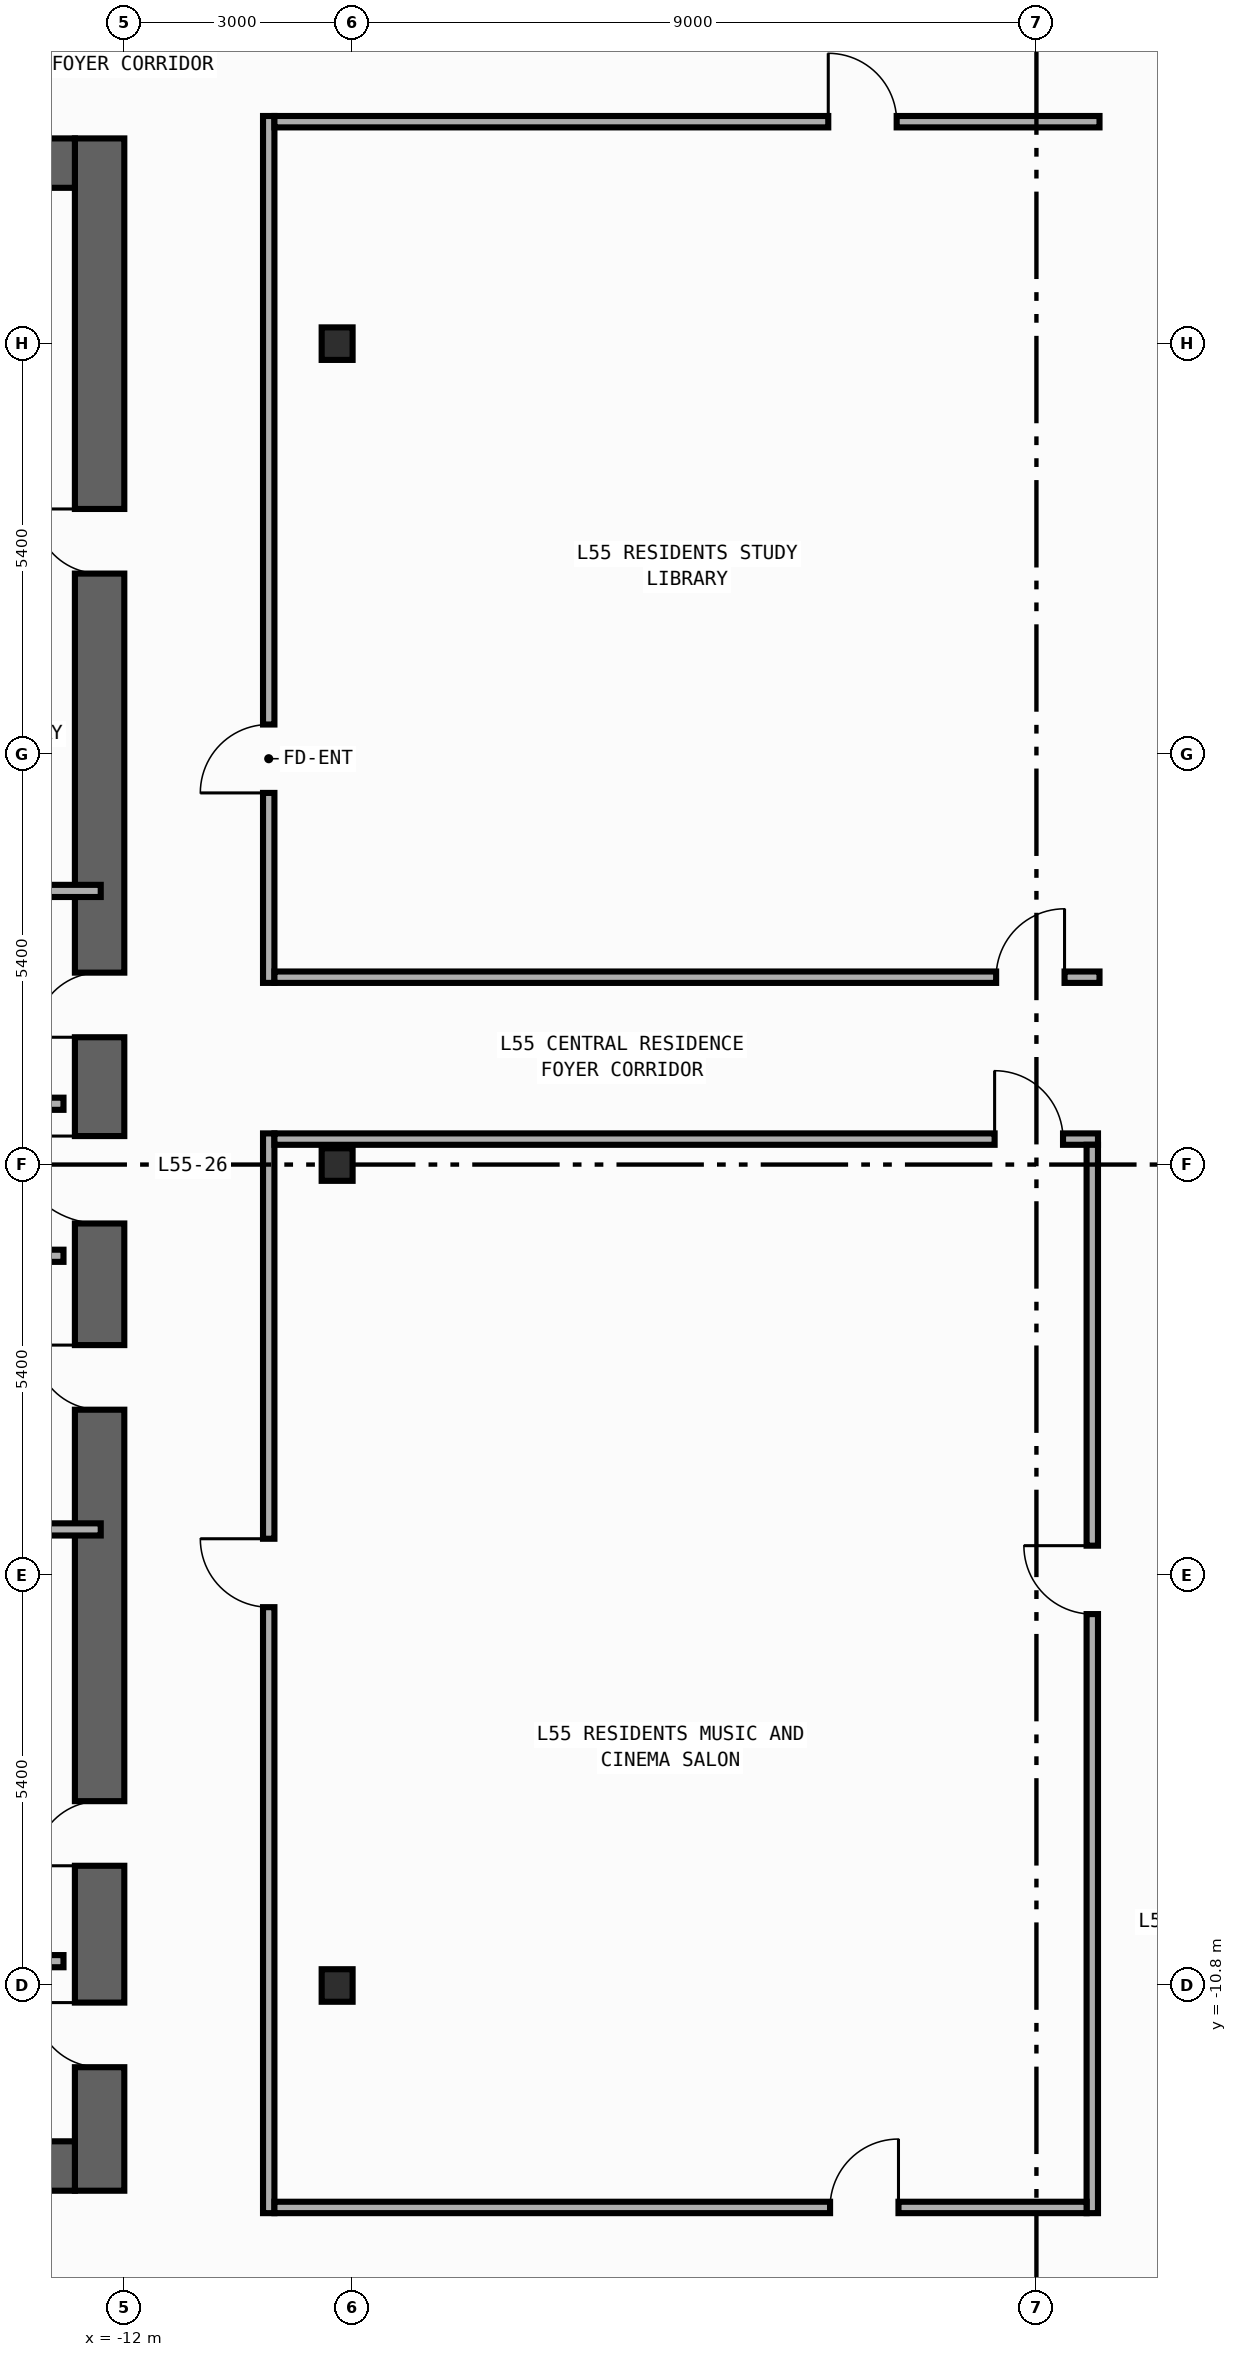
"""IFC4 building model, lengths in metres.
Left out: names, types, materials, properties, quantities, classifications, styles, units other than length and angle.
Written with IfcOpenShell. Run it as: python <this file> out.ifc"""

import sys

from ifc_helpers import new_model, si_unit, direction, frame, frame_2d, origin, origin_2d, place, context, subcontext, project, spatial, rectangle, i_section, extrude, element, fill, save


model = new_model("IFC4")
c1 = context("Model", 3, precision=1e-05, world=origin(), true_north=direction((0.0, 1.0)))
c2 = subcontext(c1, "Body", "Model", "MODEL_VIEW")
j1 = project(units=[si_unit("LENGTHUNIT", "METRE"), si_unit("PLANEANGLEUNIT", "RADIAN")], contexts=[c1])
p1 = place(None, origin())
s1 = spatial("IfcSite", under=j1, at=p1, CompositionType="ELEMENT")
p2 = place(p1, origin())
s2 = spatial("IfcBuilding", under=s1, at=p2, CompositionType="ELEMENT")
p3 = place(p2, frame((0.0, 0.0, 236.8)))
s3 = spatial("IfcBuildingStorey", under=s2, at=p3, CompositionType="ELEMENT", Elevation=236.8)
p4 = place(p3, frame((-12.325, -13.5, 0.0), z_axis=(0.0, 0.0, 1.0), x_axis=(0.0, 1.0, 0.0)))
e1 = element("IfcWall", 1, at=p4, inside=s3, PredefinedType="SHEAR", context=c2, shape_type="SweptSolid", body=[
    extrude(rectangle(XDim=27.0, YDim=0.65, at=frame_2d((13.5, 0.0))), origin(), (0.0, 0.0, 1.0), 3.34),
])
p5 = place(p4, frame((15.175, 0.0, 0.0)))
e2 = element("IfcOpeningElement", 2, at=p5, cuts=e1, PredefinedType="OPENING", context=c2, shape_type="SweptSolid", body=[
    extrude(rectangle(XDim=0.85, YDim=2.1, at=frame_2d((0.425, 1.05))), frame((0.0, 0.335, 0.0), z_axis=(0.0, -1.0, 0.0), x_axis=(1.0, 0.0, 0.0)), (0.0, 0.0, 1.0), 0.67),
])
p6 = place(p4, frame((21.275, 0.0, 0.0)))
e3 = element("IfcOpeningElement", 3, at=p6, cuts=e1, PredefinedType="OPENING", context=c2, shape_type="SweptSolid", body=[
    extrude(rectangle(XDim=0.85, YDim=2.1, at=frame_2d((0.425, 1.05))), frame((0.0, 0.335, 0.0), z_axis=(0.0, -1.0, 0.0), x_axis=(1.0, 0.0, 0.0)), (0.0, 0.0, 1.0), 0.67),
])
p7 = place(p4, frame((4.275, 0.0, 0.0)))
e4 = element("IfcOpeningElement", 4, at=p7, cuts=e1, PredefinedType="OPENING", context=c2, shape_type="SweptSolid", body=[
    extrude(rectangle(XDim=0.85, YDim=2.1, at=frame_2d((0.425, 1.05))), frame((0.0, 0.335, 0.0), z_axis=(0.0, -1.0, 0.0), x_axis=(1.0, 0.0, 0.0)), (0.0, 0.0, 1.0), 0.67),
])
p8 = place(p4, frame((10.275, 0.0, 0.0)))
e5 = element("IfcOpeningElement", 5, at=p8, cuts=e1, PredefinedType="OPENING", context=c2, shape_type="SweptSolid", body=[
    extrude(rectangle(XDim=0.85, YDim=2.1, at=frame_2d((0.425, 1.05))), frame((0.0, 0.335, 0.0), z_axis=(0.0, -1.0, 0.0), x_axis=(1.0, 0.0, 0.0)), (0.0, 0.0, 1.0), 0.67),
])
p9 = place(p4, frame((12.725, 0.0, 0.0)))
e6 = element("IfcOpeningElement", 6, at=p9, cuts=e1, PredefinedType="OPENING", context=c2, shape_type="SweptSolid", body=[
    extrude(rectangle(XDim=1.15, YDim=2.2, at=frame_2d((0.575, 1.1))), frame((0.0, 0.335, 0.0), z_axis=(0.0, -1.0, 0.0), x_axis=(1.0, 0.0, 0.0)), (0.0, 0.0, 1.0), 0.67),
])
p10 = place(p4, frame((1.625, 0.0, 0.0)))
e7 = element("IfcOpeningElement", 7, at=p10, cuts=e1, PredefinedType="OPENING", context=c2, shape_type="SweptSolid", body=[
    extrude(rectangle(XDim=0.85, YDim=2.1, at=frame_2d((0.425, 1.05))), frame((0.0, 0.335, 0.0), z_axis=(0.0, -1.0, 0.0), x_axis=(1.0, 0.0, 0.0)), (0.0, 0.0, 1.0), 0.67),
])
for number, where, z_axis, x_axis in (
    (8, (-19.75, -13.175, 0.0), (0.0, 0.0, 1.0), (1.0, 0.0, 0.0)),
    (9, (-19.75, 13.175, 0.0), (0.0, 0.0, 1.0), (1.0, 0.0, 0.0)),
):
    element("IfcWall", number, at=place(p3, frame(where, z_axis=z_axis, x_axis=x_axis)), inside=s3, PredefinedType="SHEAR", context=c2, shape_type="SweptSolid", body=[
        extrude(rectangle(XDim=7.1, YDim=0.65, at=frame_2d((3.55, 0.0))), origin(), (0.0, 0.0, 1.0), 3.34),
    ])
for number, where, z_axis, x_axis in (
    (10, (-9.2, -10.8, 0.0), (0.0, 0.0, 1.0), (1.0, 0.0, 0.0)),
    (11, (-9.2, 0.0, 0.0), (0.0, 0.0, 1.0), (1.0, 0.0, 0.0)),
    (12, (-9.2, 10.8, 0.0), (0.0, 0.0, 1.0), (1.0, 0.0, 0.0)),
):
    element("IfcColumn", number, at=place(p3, frame(where, z_axis=z_axis, x_axis=x_axis)), inside=s3, PredefinedType="COLUMN", context=c2, shape_type="SweptSolid", body=[
        extrude(i_section(OverallWidth=0.407, OverallDepth=0.428, WebThickness=0.02, FlangeThickness=0.035, FilletRadius=0.022, at=origin_2d()), origin(), (0.0, 0.0, 1.0), 3.6),
    ])
for number, where, z_axis, x_axis in (
    (13, (-15.4, 0.8, 0.0), (0.0, 0.0, 1.0), (1.0, 0.0, 0.0)),
    (14, (-15.4, -1.2, 0.0), (0.0, 0.0, 1.0), (1.0, 0.0, 0.0)),
    (15, (-15.4, -10.48, 0.0), (0.0, 0.0, 1.0), (1.0, 0.0, 0.0)),
):
    element("IfcWall", number, at=place(p3, frame(where, z_axis=z_axis, x_axis=x_axis)), inside=s3, PredefinedType="STANDARD", context=c2, shape_type="SweptSolid", body=[
        extrude(rectangle(XDim=2.6, YDim=0.16, at=frame_2d((1.3, 0.0))), origin(), (0.0, 0.0, 1.0), 3.34),
    ])
for number, where, z_axis, x_axis in (
    (16, (-15.375, 3.6, 0.0), (0.0, 0.0, 1.0), (1.0, 0.0, 0.0)),
    (17, (-15.375, -4.8, 0.0), (0.0, 0.0, 1.0), (1.0, 0.0, 0.0)),
):
    element("IfcWall", number, at=place(p3, frame(where, z_axis=z_axis, x_axis=x_axis)), inside=s3, PredefinedType="PARTITIONING", context=c2, shape_type="SweptSolid", body=[
        extrude(rectangle(XDim=3.065, YDim=0.16, at=frame_2d((1.532, 0.0))), origin(), (0.0, 0.0, 1.0), 3.34),
    ])
p11 = place(p3, frame((-10.1, 2.39, 0.0), z_axis=(0.0, 0.0, 1.0), x_axis=(0.0, 1.0, 0.0)))
e18 = element("IfcWall", 18, at=p11, inside=s3, PredefinedType="PARTITIONING", context=c2, shape_type="SweptSolid", body=[
    extrude(rectangle(XDim=11.405, YDim=0.15, at=frame_2d((5.703, 0.0))), origin(), (0.0, 0.0, 1.0), 3.34),
])
p12 = place(p11, frame((2.5, 0.0, 0.0)))
e19 = element("IfcOpeningElement", 19, at=p12, cuts=e18, PredefinedType="OPENING", context=c2, shape_type="SweptSolid", body=[
    extrude(rectangle(XDim=0.9, YDim=2.15, at=frame_2d((0.45, 1.075))), frame((0.0, 0.085, 0.0), z_axis=(0.0, -1.0, 0.0), x_axis=(1.0, 0.0, 0.0)), (0.0, 0.0, 1.0), 0.17),
])
p13 = place(p3, frame((-10.1, -13.795, 0.0), z_axis=(0.0, 0.0, 1.0), x_axis=(0.0, 1.0, 0.0)))
e20 = element("IfcWall", 20, at=p13, inside=s3, PredefinedType="PARTITIONING", context=c2, shape_type="SweptSolid", body=[
    extrude(rectangle(XDim=14.205, YDim=0.15, at=frame_2d((7.103, 0.0))), origin(), (0.0, 0.0, 1.0), 3.34),
])
p14 = place(p13, frame((7.972, 0.0, 0.0)))
e21 = element("IfcOpeningElement", 21, at=p14, cuts=e20, PredefinedType="OPENING", context=c2, shape_type="SweptSolid", body=[
    extrude(rectangle(XDim=0.9, YDim=2.15, at=frame_2d((0.45, 1.075))), frame((0.0, 0.085, 0.0), z_axis=(0.0, -1.0, 0.0), x_axis=(1.0, 0.0, 0.0)), (0.0, 0.0, 1.0), 0.17),
])
p15 = place(p3, frame((-10.025, 2.465, 0.0), z_axis=(0.0, 0.0, 1.0), x_axis=(1.0, 0.0, 0.0)))
e22 = element("IfcWall", 22, at=p15, inside=s3, PredefinedType="PARTITIONING", context=c2, shape_type="SweptSolid", body=[
    extrude(rectangle(XDim=10.855, YDim=0.15, at=frame_2d((5.427, 0.0))), origin(), (0.0, 0.0, 1.0), 3.34),
])
p16 = place(p15, frame((9.495, 0.0, 0.0)))
e23 = element("IfcOpeningElement", 23, at=p16, cuts=e22, PredefinedType="OPENING", context=c2, shape_type="SweptSolid", body=[
    extrude(rectangle(XDim=0.9, YDim=2.15, at=frame_2d((0.45, 1.075))), frame((0.0, 0.085, 0.0), z_axis=(0.0, -1.0, 0.0), x_axis=(1.0, 0.0, 0.0)), (0.0, 0.0, 1.0), 0.17),
])
p17 = place(p3, frame((-10.025, 0.335, 0.0), z_axis=(0.0, 0.0, 1.0), x_axis=(1.0, 0.0, 0.0)))
e24 = element("IfcWall", 24, at=p17, inside=s3, PredefinedType="PARTITIONING", context=c2, shape_type="SweptSolid", body=[
    extrude(rectangle(XDim=10.835, YDim=0.15, at=frame_2d((5.417, 0.0))), origin(), (0.0, 0.0, 1.0), 2.44),
])
p18 = place(p17, frame((9.475, 0.0, 0.0)))
e25 = element("IfcOpeningElement", 25, at=p18, cuts=e24, PredefinedType="OPENING", context=c2, shape_type="SweptSolid", body=[
    extrude(rectangle(XDim=0.9, YDim=2.15, at=frame_2d((0.45, 1.075))), frame((0.0, 0.085, 0.0), z_axis=(0.0, -1.0, 0.0), x_axis=(1.0, 0.0, 0.0)), (0.0, 0.0, 1.0), 0.17),
])
p19 = place(p3, frame((0.735, -13.795, 0.0), z_axis=(0.0, 0.0, 1.0), x_axis=(0.0, 1.0, 0.0)))
e26 = element("IfcWall", 26, at=p19, inside=s3, PredefinedType="PARTITIONING", context=c2, shape_type="SweptSolid", body=[
    extrude(rectangle(XDim=14.055, YDim=0.15, at=frame_2d((7.027, 0.0))), origin(), (0.0, 0.0, 1.0), 3.34),
])
p20 = place(p19, frame((7.881, 0.0, 0.0)))
e27 = element("IfcOpeningElement", 27, at=p20, cuts=e26, PredefinedType="OPENING", context=c2, shape_type="SweptSolid", body=[
    extrude(rectangle(XDim=0.9, YDim=2.15, at=frame_2d((0.45, 1.075))), frame((0.0, 0.085, 0.0), z_axis=(0.0, -1.0, 0.0), x_axis=(1.0, 0.0, 0.0)), (0.0, 0.0, 1.0), 0.17),
])
p21 = place(p3, frame((-10.025, 13.72, 0.0), z_axis=(0.0, 0.0, 1.0), x_axis=(1.0, 0.0, 0.0)))
e28 = element("IfcWall", 28, at=p21, inside=s3, PredefinedType="PARTITIONING", context=c2, shape_type="SweptSolid", body=[
    extrude(rectangle(XDim=10.855, YDim=0.15, at=frame_2d((5.427, 0.0))), origin(), (0.0, 0.0, 1.0), 3.34),
])
p22 = place(p21, frame((7.286, 0.0, 0.0)))
e29 = element("IfcOpeningElement", 29, at=p22, cuts=e28, PredefinedType="OPENING", context=c2, shape_type="SweptSolid", body=[
    extrude(rectangle(XDim=0.9, YDim=2.15, at=frame_2d((0.45, 1.075))), frame((0.0, 0.085, 0.0), z_axis=(0.0, -1.0, 0.0), x_axis=(1.0, 0.0, 0.0)), (0.0, 0.0, 1.0), 0.17),
])
p23 = place(p3, frame((-10.025, -13.72, 0.0), z_axis=(0.0, 0.0, 1.0), x_axis=(1.0, 0.0, 0.0)))
e30 = element("IfcWall", 30, at=p23, inside=s3, PredefinedType="PARTITIONING", context=c2, shape_type="SweptSolid", body=[
    extrude(rectangle(XDim=10.685, YDim=0.15, at=frame_2d((5.342, 0.0))), origin(), (0.0, 0.0, 1.0), 3.34),
])
p24 = place(p23, frame((7.31, 0.0, 0.0)))
e31 = element("IfcOpeningElement", 31, at=p24, cuts=e30, PredefinedType="OPENING", context=c2, shape_type="SweptSolid", body=[
    extrude(rectangle(XDim=0.9, YDim=2.15, at=frame_2d((0.45, 1.075))), frame((0.0, 0.085, 0.0), z_axis=(0.0, -1.0, 0.0), x_axis=(1.0, 0.0, 0.0)), (0.0, 0.0, 1.0), 0.17),
])
p25 = place(p5, origin())
e32 = element("IfcDoor", 32, at=p25, inside=s3, OperationType="SINGLE_SWING_LEFT", PredefinedType="DOOR", context=c2, shape_type="SweptSolid", body=[
    extrude(rectangle(XDim=0.85, YDim=2.1, at=frame_2d((0.425, 1.05))), frame((0.0, 0.025, 0.0), z_axis=(0.0, -1.0, 0.0), x_axis=(1.0, 0.0, 0.0)), (0.0, 0.0, 1.0), 0.05),
])
fill(e2, e32)
p26 = place(p6, origin())
e33 = element("IfcDoor", 33, at=p26, inside=s3, OperationType="SINGLE_SWING_RIGHT", PredefinedType="DOOR", context=c2, shape_type="SweptSolid", body=[
    extrude(rectangle(XDim=0.85, YDim=2.1, at=frame_2d((0.425, 1.05))), frame((0.0, 0.025, 0.0), z_axis=(0.0, -1.0, 0.0), x_axis=(1.0, 0.0, 0.0)), (0.0, 0.0, 1.0), 0.05),
])
fill(e3, e33)
p27 = place(p7, origin())
e34 = element("IfcDoor", 34, at=p27, inside=s3, OperationType="SINGLE_SWING_LEFT", PredefinedType="DOOR", context=c2, shape_type="SweptSolid", body=[
    extrude(rectangle(XDim=0.85, YDim=2.1, at=frame_2d((0.425, 1.05))), frame((0.0, 0.025, 0.0), z_axis=(0.0, -1.0, 0.0), x_axis=(1.0, 0.0, 0.0)), (0.0, 0.0, 1.0), 0.05),
])
fill(e4, e34)
p28 = place(p8, origin())
e35 = element("IfcDoor", 35, at=p28, inside=s3, OperationType="SINGLE_SWING_RIGHT", PredefinedType="DOOR", context=c2, shape_type="SweptSolid", body=[
    extrude(rectangle(XDim=0.85, YDim=2.1, at=frame_2d((0.425, 1.05))), frame((0.0, 0.025, 0.0), z_axis=(0.0, -1.0, 0.0), x_axis=(1.0, 0.0, 0.0)), (0.0, 0.0, 1.0), 0.05),
])
fill(e5, e35)
p29 = place(p9, origin())
e36 = element("IfcDoor", 36, at=p29, inside=s3, OperationType="SINGLE_SWING_RIGHT", PredefinedType="DOOR", context=c2, shape_type="SweptSolid", body=[
    extrude(rectangle(XDim=1.15, YDim=2.2, at=frame_2d((0.575, 1.1))), frame((0.0, 0.025, 0.0), z_axis=(0.0, -1.0, 0.0), x_axis=(1.0, 0.0, 0.0)), (0.0, 0.0, 1.0), 0.05),
])
fill(e6, e36)
p30 = place(p10, origin())
e37 = element("IfcDoor", 37, at=p30, inside=s3, OperationType="SINGLE_SWING_RIGHT", PredefinedType="DOOR", context=c2, shape_type="SweptSolid", body=[
    extrude(rectangle(XDim=0.85, YDim=2.1, at=frame_2d((0.425, 1.05))), frame((0.0, 0.025, 0.0), z_axis=(0.0, -1.0, 0.0), x_axis=(1.0, 0.0, 0.0)), (0.0, 0.0, 1.0), 0.05),
])
fill(e7, e37)
p31 = place(p12, origin())
e38 = element("IfcDoor", 38, at=p31, inside=s3, OperationType="SINGLE_SWING_LEFT", PredefinedType="DOOR", context=c2, shape_type="SweptSolid", body=[
    extrude(rectangle(XDim=0.9, YDim=2.15, at=frame_2d((0.45, 1.075))), frame((0.0, 0.025, 0.0), z_axis=(0.0, -1.0, 0.0), x_axis=(1.0, 0.0, 0.0)), (0.0, 0.0, 1.0), 0.05),
])
fill(e19, e38)
p32 = place(p14, origin())
e39 = element("IfcDoor", 39, at=p32, inside=s3, OperationType="SINGLE_SWING_RIGHT", PredefinedType="DOOR", context=c2, shape_type="SweptSolid", body=[
    extrude(rectangle(XDim=0.9, YDim=2.15, at=frame_2d((0.45, 1.075))), frame((0.0, 0.025, 0.0), z_axis=(0.0, -1.0, 0.0), x_axis=(1.0, 0.0, 0.0)), (0.0, 0.0, 1.0), 0.05),
])
fill(e21, e39)
p33 = place(p16, origin())
e40 = element("IfcDoor", 40, at=p33, inside=s3, OperationType="SINGLE_SWING_RIGHT", PredefinedType="DOOR", context=c2, shape_type="SweptSolid", body=[
    extrude(rectangle(XDim=0.9, YDim=2.15, at=frame_2d((0.45, 1.075))), frame((0.0, 0.025, 0.0), z_axis=(0.0, -1.0, 0.0), x_axis=(1.0, 0.0, 0.0)), (0.0, 0.0, 1.0), 0.05),
])
fill(e23, e40)
p34 = place(p18, origin())
e41 = element("IfcDoor", 41, at=p34, inside=s3, OperationType="SINGLE_SWING_LEFT", PredefinedType="DOOR", context=c2, shape_type="SweptSolid", body=[
    extrude(rectangle(XDim=0.9, YDim=2.15, at=frame_2d((0.45, 1.075))), frame((0.0, 0.025, 0.0), z_axis=(0.0, -1.0, 0.0), x_axis=(1.0, 0.0, 0.0)), (0.0, 0.0, 1.0), 0.05),
])
fill(e25, e41)
p35 = place(p20, origin())
e42 = element("IfcDoor", 42, at=p35, inside=s3, OperationType="SINGLE_SWING_RIGHT", PredefinedType="DOOR", context=c2, shape_type="SweptSolid", body=[
    extrude(rectangle(XDim=0.9, YDim=2.15, at=frame_2d((0.45, 1.075))), frame((0.0, 0.025, 0.0), z_axis=(0.0, -1.0, 0.0), x_axis=(1.0, 0.0, 0.0)), (0.0, 0.0, 1.0), 0.05),
])
fill(e27, e42)
p36 = place(p22, origin())
e43 = element("IfcDoor", 43, at=p36, inside=s3, OperationType="SINGLE_SWING_LEFT", PredefinedType="DOOR", context=c2, shape_type="SweptSolid", body=[
    extrude(rectangle(XDim=0.9, YDim=2.15, at=frame_2d((0.45, 1.075))), frame((0.0, 0.025, 0.0), z_axis=(0.0, -1.0, 0.0), x_axis=(1.0, 0.0, 0.0)), (0.0, 0.0, 1.0), 0.05),
])
fill(e29, e43)
p37 = place(p24, origin())
e44 = element("IfcDoor", 44, at=p37, inside=s3, OperationType="SINGLE_SWING_RIGHT", PredefinedType="DOOR", context=c2, shape_type="SweptSolid", body=[
    extrude(rectangle(XDim=0.9, YDim=2.15, at=frame_2d((0.45, 1.075))), frame((0.0, 0.025, 0.0), z_axis=(0.0, -1.0, 0.0), x_axis=(1.0, 0.0, 0.0)), (0.0, 0.0, 1.0), 0.05),
])
fill(e31, e44)
save(model, sys.argv[1])
